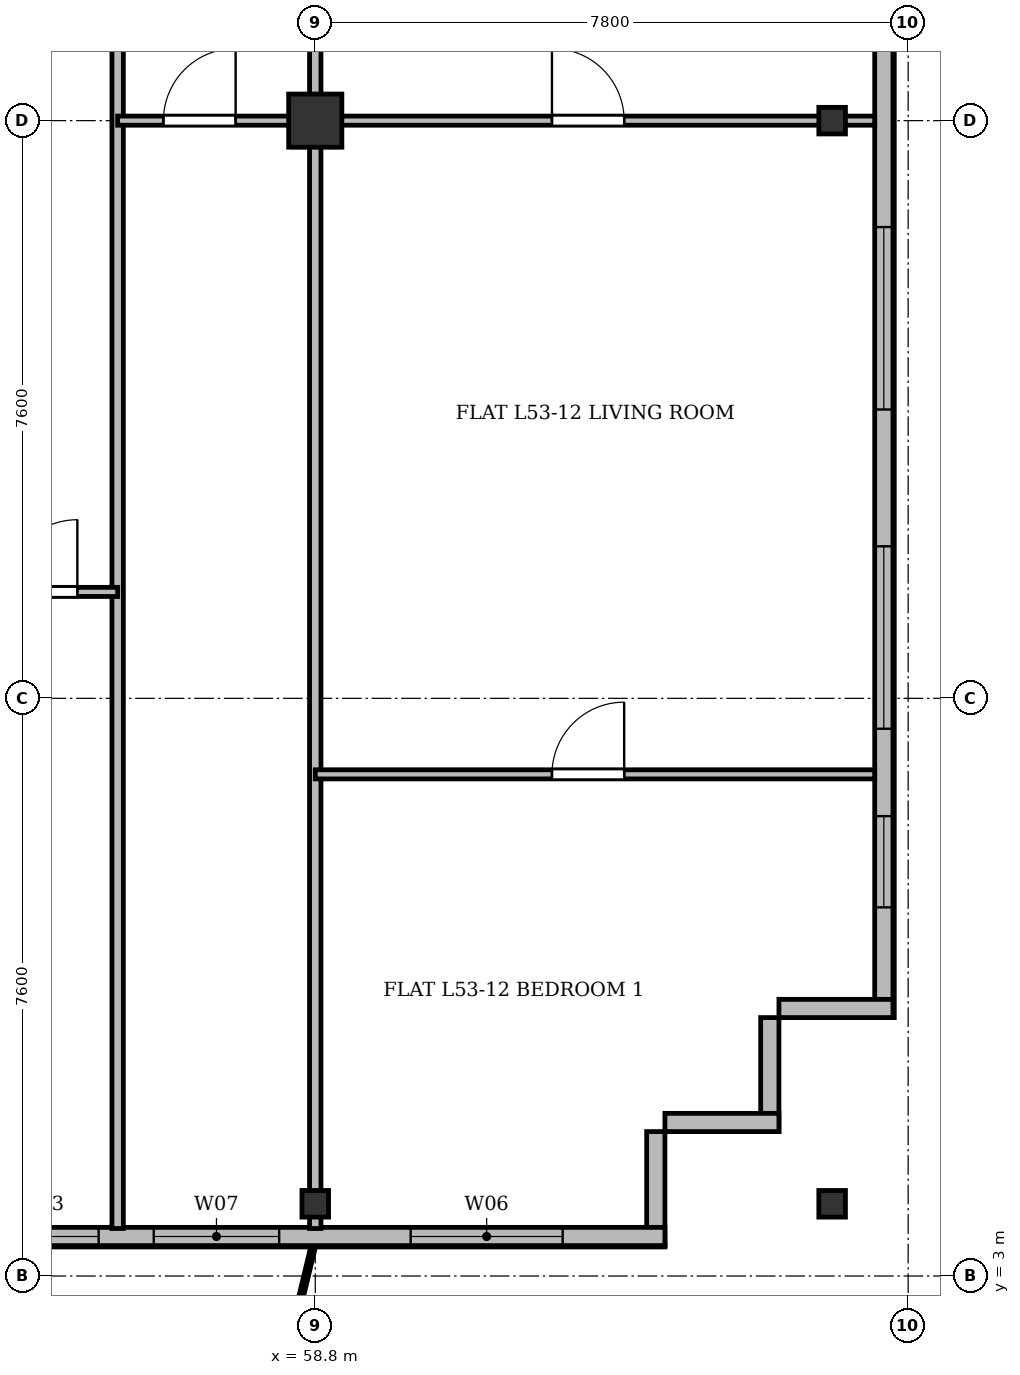
"""IFC4 building model, lengths in metres.
Left out: names, types, materials, properties, quantities, classifications, styles, units other than length and angle.
Written with IfcOpenShell. Run it as: python <this file> out.ifc"""

import sys

from ifc_helpers import new_model, si_unit, direction, frame, frame_2d, origin, origin_2d, place, context, subcontext, project, spatial, rectangle, i_section, extrude, source, transform, mapped, element, fill, save


model = new_model("IFC4")
c1 = context("Model", 3, precision=1e-05, world=origin(), true_north=direction((0.0, 1.0)))
c2 = subcontext(c1, "Body", "Model", "MODEL_VIEW")
j1 = project(units=[si_unit("LENGTHUNIT", "METRE"), si_unit("PLANEANGLEUNIT", "RADIAN")], contexts=[c1])
p1 = place(None, origin())
s1 = spatial("IfcSite", under=j1, at=p1, CompositionType="ELEMENT")
p2 = place(p1, origin())
s2 = spatial("IfcBuilding", under=s1, at=p2, CompositionType="ELEMENT")
p3 = place(p2, frame((0.0, 0.0, 204.9)))
s3 = spatial("IfcBuildingStorey", under=s2, at=p3, CompositionType="ELEMENT", Elevation=204.9)
m1 = source(origin(), c2, "Body", "SweptSolid", [
    extrude(i_section(OverallWidth=0.35, OverallDepth=0.35, WebThickness=0.018, FlangeThickness=0.028, at=origin_2d()), origin(), (0.0, 0.0, 1.0), 3.6),
])
p4 = place(p3, frame((58.8, 3.95, 0.0), z_axis=(0.0, 0.0, 1.0), x_axis=(1.0, 0.0, 0.0)))
e1 = element("IfcColumn", 1, at=p4, inside=s3, PredefinedType="COLUMN", context=c2, shape_type="MappedRepresentation", body=[
    mapped(m1, transform((0.0, 0.0, 0.0), x_axis=(1.0, 0.0, 0.0), y_axis=(0.0, 1.0, 0.0), z_axis=(0.0, 0.0, 1.0), scale=1.0)),
])
m2 = source(origin(), c2, "Body", "SweptSolid", [
    extrude(rectangle(XDim=0.7, YDim=0.7, at=origin_2d()), origin(), (0.0, 0.0, 1.0), 3.6),
])
p5 = place(p3, frame((58.8, 18.2, 0.0), z_axis=(0.0, 0.0, 1.0), x_axis=(1.0, 0.0, 0.0)))
e2 = element("IfcColumn", 2, at=p5, inside=s3, PredefinedType="COLUMN", context=c2, shape_type="MappedRepresentation", body=[
    mapped(m2, transform((0.0, 0.0, 0.0), x_axis=(1.0, 0.0, 0.0), y_axis=(0.0, 1.0, 0.0), z_axis=(0.0, 0.0, 1.0), scale=1.0)),
])
for number, where, z_axis, x_axis in (
    (3, (65.6, 3.95, 0.0), (0.0, 0.0, 1.0), (1.0, 0.0, 0.0)),
    (4, (65.6, 18.2, 0.0), (0.0, 0.0, 1.0), (1.0, 0.0, 0.0)),
):
    element("IfcColumn", number, at=place(p3, frame(where, z_axis=z_axis, x_axis=x_axis)), inside=s3, PredefinedType="COLUMN", context=c2, shape_type="MappedRepresentation", body=[
        mapped(m1, transform((0.0, 0.0, 0.0), x_axis=(1.0, 0.0, 0.0), y_axis=(0.0, 1.0, 0.0), z_axis=(0.0, 0.0, 1.0), scale=1.0)),
    ])
p6 = place(p3, frame((66.28, 45.5, 0.0), z_axis=(0.0, 0.0, 1.0), x_axis=(0.0, -1.0, 0.0)))
e5 = element("IfcWall", 5, at=p6, inside=s3, PredefinedType="SOLIDWALL", context=c2, shape_type="SweptSolid", body=[
    extrude(rectangle(XDim=39.1, YDim=0.24, at=frame_2d((19.55, 0.0))), origin(), (0.0, 0.0, 1.0), 3.36),
])
p7 = place(p6, frame((36.45, 0.0, 0.92)))
e6 = element("IfcOpeningElement", 6, at=p7, cuts=e5, PredefinedType="OPENING", context=c2, shape_type="SweptSolid", body=[
    extrude(rectangle(XDim=1.2, YDim=1.65, at=frame_2d((0.6, 0.825))), frame((0.0, 0.13, 0.0), z_axis=(0.0, -1.0, 0.0), x_axis=(1.0, 0.0, 0.0)), (0.0, 0.0, 1.0), 0.26),
])
p8 = place(p6, frame((32.9, 0.0, 0.92)))
e7 = element("IfcOpeningElement", 7, at=p8, cuts=e5, PredefinedType="OPENING", context=c2, shape_type="SweptSolid", body=[
    extrude(rectangle(XDim=2.4, YDim=2.1, at=frame_2d((1.2, 1.05))), frame((0.0, 0.13, 0.0), z_axis=(0.0, -1.0, 0.0), x_axis=(1.0, 0.0, 0.0)), (0.0, 0.0, 1.0), 0.26),
])
p9 = place(p6, frame((28.7, 0.0, 0.92)))
e8 = element("IfcOpeningElement", 8, at=p9, cuts=e5, PredefinedType="OPENING", context=c2, shape_type="SweptSolid", body=[
    extrude(rectangle(XDim=2.4, YDim=2.1, at=frame_2d((1.2, 1.05))), frame((0.0, 0.13, 0.0), z_axis=(0.0, -1.0, 0.0), x_axis=(1.0, 0.0, 0.0)), (0.0, 0.0, 1.0), 0.26),
])
p10 = place(p6, frame((21.5, 0.0, 0.92)))
e9 = element("IfcOpeningElement", 9, at=p10, cuts=e5, PredefinedType="OPENING", context=c2, shape_type="SweptSolid", body=[
    extrude(rectangle(XDim=2.4, YDim=2.1, at=frame_2d((1.2, 1.05))), frame((0.0, 0.13, 0.0), z_axis=(0.0, -1.0, 0.0), x_axis=(1.0, 0.0, 0.0)), (0.0, 0.0, 1.0), 0.26),
])
p11 = place(p6, frame((7.5, 0.0, 0.92)))
e10 = element("IfcOpeningElement", 10, at=p11, cuts=e5, PredefinedType="OPENING", context=c2, shape_type="SweptSolid", body=[
    extrude(rectangle(XDim=2.4, YDim=2.1, at=frame_2d((1.2, 1.05))), frame((0.0, 0.13, 0.0), z_axis=(0.0, -1.0, 0.0), x_axis=(1.0, 0.0, 0.0)), (0.0, 0.0, 1.0), 0.26),
])
p12 = place(p6, frame((4.5, 0.0, 0.92)))
e11 = element("IfcOpeningElement", 11, at=p12, cuts=e5, PredefinedType="OPENING", context=c2, shape_type="SweptSolid", body=[
    extrude(rectangle(XDim=1.2, YDim=1.65, at=frame_2d((0.6, 0.825))), frame((0.0, 0.13, 0.0), z_axis=(0.0, -1.0, 0.0), x_axis=(1.0, 0.0, 0.0)), (0.0, 0.0, 1.0), 0.26),
])
p13 = place(p6, frame((1.15, 0.0, 0.92)))
e12 = element("IfcOpeningElement", 12, at=p13, cuts=e5, PredefinedType="OPENING", context=c2, shape_type="SweptSolid", body=[
    extrude(rectangle(XDim=1.2, YDim=1.65, at=frame_2d((0.6, 0.825))), frame((0.0, 0.13, 0.0), z_axis=(0.0, -1.0, 0.0), x_axis=(1.0, 0.0, 0.0)), (0.0, 0.0, 1.0), 0.26),
])
p14 = place(p3, frame((66.4, 6.52, 0.0), z_axis=(0.0, 0.0, 1.0), x_axis=(-1.0, 0.0, 0.0)))
e13 = element("IfcWall", 13, at=p14, inside=s3, PredefinedType="SOLIDWALL", context=c2, shape_type="SweptSolid", body=[
    extrude(rectangle(XDim=1.5, YDim=0.24, at=frame_2d((0.75, 0.0))), origin(), (0.0, 0.0, 1.0), 2.86),
])
for number, where, z_axis, x_axis in (
    (14, (64.78, 6.4, 0.0), (0.0, 0.0, 1.0), (0.0, -1.0, 0.0)),
    (15, (64.9, 5.02, 0.0), (0.0, 0.0, 1.0), (-1.0, 0.0, 0.0)),
):
    element("IfcWall", number, at=place(p3, frame(where, z_axis=z_axis, x_axis=x_axis)), inside=s3, PredefinedType="SOLIDWALL", context=c2, shape_type="SweptSolid", body=[
        extrude(rectangle(XDim=1.5, YDim=0.24, at=frame_2d((0.75, 0.0))), origin(), (0.0, 0.0, 1.0), 3.36),
    ])
p15 = place(p3, frame((63.28, 4.9, 0.0), z_axis=(0.0, 0.0, 1.0), x_axis=(0.0, -1.0, 0.0)))
e16 = element("IfcWall", 16, at=p15, inside=s3, PredefinedType="SOLIDWALL", context=c2, shape_type="SweptSolid", body=[
    extrude(rectangle(XDim=1.5, YDim=0.24, at=frame_2d((0.75, 0.0))), origin(), (0.0, 0.0, 1.0), 2.91),
])
p16 = place(p3, frame((63.4, 3.52, 0.0), z_axis=(0.0, 0.0, 1.0), x_axis=(-1.0, 0.0, 0.0)))
e17 = element("IfcWall", 17, at=p16, inside=s3, PredefinedType="SOLIDWALL", context=c2, shape_type="SweptSolid", body=[
    extrude(rectangle(XDim=52.4, YDim=0.24, at=frame_2d((26.2, 0.0))), origin(), (0.0, 0.0, 1.0), 3.36),
])
p17 = place(p16, frame((1.345, 0.0, 0.9)))
e18 = element("IfcOpeningElement", 18, at=p17, cuts=e17, PredefinedType="OPENING", context=c2, shape_type="SweptSolid", body=[
    extrude(rectangle(XDim=2.0, YDim=1.95, at=frame_2d((1.0, 0.975))), frame((0.0, 0.13, 0.0), z_axis=(0.0, -1.0, 0.0), x_axis=(1.0, 0.0, 0.0)), (0.0, 0.0, 1.0), 0.26),
])
p18 = place(p16, frame((5.075, 0.0, 0.9)))
e19 = element("IfcOpeningElement", 19, at=p18, cuts=e17, PredefinedType="OPENING", context=c2, shape_type="SweptSolid", body=[
    extrude(rectangle(XDim=1.65, YDim=1.85, at=frame_2d((0.825, 0.925))), frame((0.0, 0.13, 0.0), z_axis=(0.0, -1.0, 0.0), x_axis=(1.0, 0.0, 0.0)), (0.0, 0.0, 1.0), 0.26),
])
p19 = place(p16, frame((7.45, 0.0, 0.9)))
e20 = element("IfcOpeningElement", 20, at=p19, cuts=e17, PredefinedType="OPENING", context=c2, shape_type="SweptSolid", body=[
    extrude(rectangle(XDim=1.5, YDim=1.75, at=frame_2d((0.75, 0.875))), frame((0.0, 0.13, 0.0), z_axis=(0.0, -1.0, 0.0), x_axis=(1.0, 0.0, 0.0)), (0.0, 0.0, 1.0), 0.26),
])
p20 = place(p16, frame((9.7, 0.0, 0.9)))
e21 = element("IfcOpeningElement", 21, at=p20, cuts=e17, PredefinedType="OPENING", context=c2, shape_type="SweptSolid", body=[
    extrude(rectangle(XDim=2.2, YDim=1.8, at=frame_2d((1.1, 0.9))), frame((0.0, 0.13, 0.0), z_axis=(0.0, -1.0, 0.0), x_axis=(1.0, 0.0, 0.0)), (0.0, 0.0, 1.0), 0.26),
])
p21 = place(p16, frame((14.217, 0.0, 0.0)))
e22 = element("IfcOpeningElement", 22, at=p21, cuts=e17, PredefinedType="OPENING", context=c2, shape_type="SweptSolid", body=[
    extrude(rectangle(XDim=1.2, YDim=2.2, at=frame_2d((0.6, 1.1))), frame((0.0, 0.13, 0.0), z_axis=(0.0, -1.0, 0.0), x_axis=(1.0, 0.0, 0.0)), (0.0, 0.0, 1.0), 0.26),
])
p22 = place(p16, frame((19.934, 0.0, 0.9)))
e23 = element("IfcOpeningElement", 23, at=p22, cuts=e17, PredefinedType="OPENING", context=c2, shape_type="SweptSolid", body=[
    extrude(rectangle(XDim=2.0, YDim=1.95, at=frame_2d((1.0, 0.975))), frame((0.0, 0.13, 0.0), z_axis=(0.0, -1.0, 0.0), x_axis=(1.0, 0.0, 0.0)), (0.0, 0.0, 1.0), 0.26),
])
p23 = place(p16, frame((22.775, 0.0, 0.9)))
e24 = element("IfcOpeningElement", 24, at=p23, cuts=e17, PredefinedType="OPENING", context=c2, shape_type="SweptSolid", body=[
    extrude(rectangle(XDim=1.65, YDim=1.85, at=frame_2d((0.825, 0.925))), frame((0.0, 0.13, 0.0), z_axis=(0.0, -1.0, 0.0), x_axis=(1.0, 0.0, 0.0)), (0.0, 0.0, 1.0), 0.26),
])
p24 = place(p16, frame((25.367, 0.0, 0.9)))
e25 = element("IfcOpeningElement", 25, at=p24, cuts=e17, PredefinedType="OPENING", context=c2, shape_type="SweptSolid", body=[
    extrude(rectangle(XDim=1.8, YDim=1.8, at=frame_2d((0.9, 0.9))), frame((0.0, 0.13, 0.0), z_axis=(0.0, -1.0, 0.0), x_axis=(1.0, 0.0, 0.0)), (0.0, 0.0, 1.0), 0.26),
])
p25 = place(p16, frame((29.1, 0.0, 0.9)))
e26 = element("IfcOpeningElement", 26, at=p25, cuts=e17, PredefinedType="OPENING", context=c2, shape_type="SweptSolid", body=[
    extrude(rectangle(XDim=2.2, YDim=1.8, at=frame_2d((1.1, 0.9))), frame((0.0, 0.13, 0.0), z_axis=(0.0, -1.0, 0.0), x_axis=(1.0, 0.0, 0.0)), (0.0, 0.0, 1.0), 0.26),
])
p26 = place(p16, frame((33.25, 0.0, 0.9)))
e27 = element("IfcOpeningElement", 27, at=p26, cuts=e17, PredefinedType="OPENING", context=c2, shape_type="SweptSolid", body=[
    extrude(rectangle(XDim=1.5, YDim=1.75, at=frame_2d((0.75, 0.875))), frame((0.0, 0.13, 0.0), z_axis=(0.0, -1.0, 0.0), x_axis=(1.0, 0.0, 0.0)), (0.0, 0.0, 1.0), 0.26),
])
p27 = place(p16, frame((35.65, 0.0, 0.9)))
e28 = element("IfcOpeningElement", 28, at=p27, cuts=e17, PredefinedType="OPENING", context=c2, shape_type="SweptSolid", body=[
    extrude(rectangle(XDim=1.5, YDim=1.75, at=frame_2d((0.75, 0.875))), frame((0.0, 0.13, 0.0), z_axis=(0.0, -1.0, 0.0), x_axis=(1.0, 0.0, 0.0)), (0.0, 0.0, 1.0), 0.26),
])
p28 = place(p16, frame((37.975, 0.0, 0.9)))
e29 = element("IfcOpeningElement", 29, at=p28, cuts=e17, PredefinedType="OPENING", context=c2, shape_type="SweptSolid", body=[
    extrude(rectangle(XDim=1.65, YDim=1.85, at=frame_2d((0.825, 0.925))), frame((0.0, 0.13, 0.0), z_axis=(0.0, -1.0, 0.0), x_axis=(1.0, 0.0, 0.0)), (0.0, 0.0, 1.0), 0.26),
])
p29 = place(p16, frame((41.456, 0.0, 0.0)))
e30 = element("IfcOpeningElement", 30, at=p29, cuts=e17, PredefinedType="OPENING", context=c2, shape_type="SweptSolid", body=[
    extrude(rectangle(XDim=1.2, YDim=2.2, at=frame_2d((0.6, 1.1))), frame((0.0, 0.13, 0.0), z_axis=(0.0, -1.0, 0.0), x_axis=(1.0, 0.0, 0.0)), (0.0, 0.0, 1.0), 0.26),
])
p30 = place(p16, frame((43.45, 0.0, 0.9)))
e31 = element("IfcOpeningElement", 31, at=p30, cuts=e17, PredefinedType="OPENING", context=c2, shape_type="SweptSolid", body=[
    extrude(rectangle(XDim=1.5, YDim=1.75, at=frame_2d((0.75, 0.875))), frame((0.0, 0.13, 0.0), z_axis=(0.0, -1.0, 0.0), x_axis=(1.0, 0.0, 0.0)), (0.0, 0.0, 1.0), 0.26),
])
p31 = place(p16, frame((45.75, 0.0, 0.9)))
e32 = element("IfcOpeningElement", 32, at=p31, cuts=e17, PredefinedType="OPENING", context=c2, shape_type="SweptSolid", body=[
    extrude(rectangle(XDim=1.5, YDim=1.75, at=frame_2d((0.75, 0.875))), frame((0.0, 0.13, 0.0), z_axis=(0.0, -1.0, 0.0), x_axis=(1.0, 0.0, 0.0)), (0.0, 0.0, 1.0), 0.26),
])
p32 = place(p16, frame((49.055, 0.0, 0.9)))
e33 = element("IfcOpeningElement", 33, at=p32, cuts=e17, PredefinedType="OPENING", context=c2, shape_type="SweptSolid", body=[
    extrude(rectangle(XDim=2.0, YDim=1.95, at=frame_2d((1.0, 0.975))), frame((0.0, 0.13, 0.0), z_axis=(0.0, -1.0, 0.0), x_axis=(1.0, 0.0, 0.0)), (0.0, 0.0, 1.0), 0.26),
])
p33 = place(p3, frame((58.8, 3.625, 0.0), z_axis=(0.0, 0.0, 1.0), x_axis=(0.0, 1.0, 0.0)))
e34 = element("IfcWall", 34, at=p33, inside=s3, PredefinedType="PARTITIONING", context=c2, shape_type="SweptSolid", body=[
    extrude(rectangle(XDim=27.175, YDim=0.15, at=frame_2d((13.587, 0.0))), origin(), (0.0, 0.0, 1.0), 2.86),
])
p34 = place(p3, frame((56.2, 3.625, 0.0), z_axis=(0.0, 0.0, 1.0), x_axis=(0.0, 1.0, 0.0)))
e35 = element("IfcWall", 35, at=p34, inside=s3, PredefinedType="PARTITIONING", context=c2, shape_type="SweptSolid", body=[
    extrude(rectangle(XDim=27.175, YDim=0.15, at=frame_2d((13.587, 0.0))), origin(), (0.0, 0.0, 1.0), 2.91),
])
p35 = place(p3, frame((54.2, 12.0, 0.0), z_axis=(0.0, 0.0, 1.0), x_axis=(1.0, 0.0, 0.0)))
e36 = element("IfcWall", 36, at=p35, inside=s3, PredefinedType="PARTITIONING", context=c2, shape_type="SweptSolid", body=[
    extrude(rectangle(XDim=2.0, YDim=0.12, at=frame_2d((1.0, 0.0))), origin(), (0.0, 0.0, 1.0), 3.36),
])
p36 = place(p35, frame((0.52, 0.0, 0.0)))
e37 = element("IfcOpeningElement", 37, at=p36, cuts=e36, PredefinedType="OPENING", context=c2, shape_type="SweptSolid", body=[
    extrude(rectangle(XDim=0.95, YDim=2.15, at=frame_2d((0.475, 1.075))), frame((0.0, 0.07, 0.0), z_axis=(0.0, -1.0, 0.0), x_axis=(1.0, 0.0, 0.0)), (0.0, 0.0, 1.0), 0.14),
])
p37 = place(p3, frame((56.2, 18.2, 0.0), z_axis=(0.0, 0.0, 1.0), x_axis=(1.0, 0.0, 0.0)))
e38 = element("IfcWall", 38, at=p37, inside=s3, PredefinedType="PARTITIONING", context=c2, shape_type="SweptSolid", body=[
    extrude(rectangle(XDim=2.6, YDim=0.12, at=frame_2d((1.3, 0.0))), origin(), (0.0, 0.0, 1.0), 2.91),
])
p38 = place(p37, frame((0.602, 0.0, 0.0)))
e39 = element("IfcOpeningElement", 39, at=p38, cuts=e38, PredefinedType="OPENING", context=c2, shape_type="SweptSolid", body=[
    extrude(rectangle(XDim=0.95, YDim=2.15, at=frame_2d((0.475, 1.075))), frame((0.0, 0.07, 0.0), z_axis=(0.0, -1.0, 0.0), x_axis=(1.0, 0.0, 0.0)), (0.0, 0.0, 1.0), 0.14),
])
p39 = place(p3, frame((58.8, 18.2, 0.0), z_axis=(0.0, 0.0, 1.0), x_axis=(1.0, 0.0, 0.0)))
e40 = element("IfcWall", 40, at=p39, inside=s3, PredefinedType="PARTITIONING", context=c2, shape_type="SweptSolid", body=[
    extrude(rectangle(XDim=7.36, YDim=0.12, at=frame_2d((3.68, 0.0))), origin(), (0.0, 0.0, 1.0), 2.91),
])
p40 = place(p39, frame((3.114, 0.0, 0.0)))
e41 = element("IfcOpeningElement", 41, at=p40, cuts=e40, PredefinedType="OPENING", context=c2, shape_type="SweptSolid", body=[
    extrude(rectangle(XDim=0.95, YDim=2.15, at=frame_2d((0.475, 1.075))), frame((0.0, 0.07, 0.0), z_axis=(0.0, -1.0, 0.0), x_axis=(1.0, 0.0, 0.0)), (0.0, 0.0, 1.0), 0.14),
])
p41 = place(p3, frame((58.8, 9.6, 0.0), z_axis=(0.0, 0.0, 1.0), x_axis=(1.0, 0.0, 0.0)))
e42 = element("IfcWall", 42, at=p41, inside=s3, PredefinedType="PARTITIONING", context=c2, shape_type="SweptSolid", body=[
    extrude(rectangle(XDim=7.36, YDim=0.12, at=frame_2d((3.68, 0.0))), origin(), (0.0, 0.0, 1.0), 2.86),
])
p42 = place(p41, frame((3.114, 0.0, 0.0)))
e43 = element("IfcOpeningElement", 43, at=p42, cuts=e42, PredefinedType="OPENING", context=c2, shape_type="SweptSolid", body=[
    extrude(rectangle(XDim=0.95, YDim=2.15, at=frame_2d((0.475, 1.075))), frame((0.0, 0.07, 0.0), z_axis=(0.0, -1.0, 0.0), x_axis=(1.0, 0.0, 0.0)), (0.0, 0.0, 1.0), 0.14),
])
m3 = source(origin(), c2, "Body", "SweptSolid", [
    extrude(rectangle(XDim=1.2, YDim=1.65, at=frame_2d((0.6, 0.825))), frame((0.0, 0.03, 0.0), z_axis=(0.0, -1.0, 0.0), x_axis=(1.0, 0.0, 0.0)), (0.0, 0.0, 1.0), 0.06),
])
p43 = place(p7, origin())
e44 = element("IfcWindow", 44, at=p43, inside=s3, PartitioningType="SINGLE_PANEL", PredefinedType="WINDOW", context=c2, shape_type="MappedRepresentation", body=[
    mapped(m3, transform((0.0, 0.0, 0.0), x_axis=(1.0, 0.0, 0.0), y_axis=(0.0, 1.0, 0.0), z_axis=(0.0, 0.0, 1.0), scale=1.0)),
])
fill(e6, e44)
m4 = source(origin(), c2, "Body", "SweptSolid", [
    extrude(rectangle(XDim=2.4, YDim=2.1, at=frame_2d((1.2, 1.05))), frame((0.0, 0.03, 0.0), z_axis=(0.0, -1.0, 0.0), x_axis=(1.0, 0.0, 0.0)), (0.0, 0.0, 1.0), 0.06),
])
p44 = place(p8, origin())
e45 = element("IfcWindow", 45, at=p44, inside=s3, PartitioningType="SINGLE_PANEL", PredefinedType="WINDOW", context=c2, shape_type="MappedRepresentation", body=[
    mapped(m4, transform((0.0, 0.0, 0.0), x_axis=(1.0, 0.0, 0.0), y_axis=(0.0, 1.0, 0.0), z_axis=(0.0, 0.0, 1.0), scale=1.0)),
])
fill(e7, e45)
p45 = place(p9, origin())
e46 = element("IfcWindow", 46, at=p45, inside=s3, PartitioningType="SINGLE_PANEL", PredefinedType="WINDOW", context=c2, shape_type="MappedRepresentation", body=[
    mapped(m4, transform((0.0, 0.0, 0.0), x_axis=(1.0, 0.0, 0.0), y_axis=(0.0, 1.0, 0.0), z_axis=(0.0, 0.0, 1.0), scale=1.0)),
])
fill(e8, e46)
m5 = source(origin(), c2, "Body", "SweptSolid", [
    extrude(rectangle(XDim=2.0, YDim=1.95, at=frame_2d((1.0, 0.975))), frame((0.0, 0.03, 0.0), z_axis=(0.0, -1.0, 0.0), x_axis=(1.0, 0.0, 0.0)), (0.0, 0.0, 1.0), 0.06),
])
p46 = place(p17, origin())
e47 = element("IfcWindow", 47, at=p46, inside=s3, PartitioningType="SINGLE_PANEL", PredefinedType="WINDOW", context=c2, shape_type="MappedRepresentation", body=[
    mapped(m5, transform((0.0, 0.0, 0.0), x_axis=(1.0, 0.0, 0.0), y_axis=(0.0, 1.0, 0.0), z_axis=(0.0, 0.0, 1.0), scale=1.0)),
])
fill(e18, e47)
m6 = source(origin(), c2, "Body", "SweptSolid", [
    extrude(rectangle(XDim=1.65, YDim=1.85, at=frame_2d((0.825, 0.925))), frame((0.0, 0.03, 0.0), z_axis=(0.0, -1.0, 0.0), x_axis=(1.0, 0.0, 0.0)), (0.0, 0.0, 1.0), 0.06),
])
p47 = place(p18, origin())
e48 = element("IfcWindow", 48, at=p47, inside=s3, PartitioningType="SINGLE_PANEL", PredefinedType="WINDOW", context=c2, shape_type="MappedRepresentation", body=[
    mapped(m6, transform((0.0, 0.0, 0.0), x_axis=(1.0, 0.0, 0.0), y_axis=(0.0, 1.0, 0.0), z_axis=(0.0, 0.0, 1.0), scale=1.0)),
])
fill(e19, e48)
m7 = source(origin(), c2, "Body", "SweptSolid", [
    extrude(rectangle(XDim=1.5, YDim=1.75, at=frame_2d((0.75, 0.875))), frame((0.0, 0.03, 0.0), z_axis=(0.0, -1.0, 0.0), x_axis=(1.0, 0.0, 0.0)), (0.0, 0.0, 1.0), 0.06),
])
p48 = place(p19, origin())
e49 = element("IfcWindow", 49, at=p48, inside=s3, PartitioningType="SINGLE_PANEL", PredefinedType="WINDOW", context=c2, shape_type="MappedRepresentation", body=[
    mapped(m7, transform((0.0, 0.0, 0.0), x_axis=(1.0, 0.0, 0.0), y_axis=(0.0, 1.0, 0.0), z_axis=(0.0, 0.0, 1.0), scale=1.0)),
])
fill(e20, e49)
m8 = source(origin(), c2, "Body", "SweptSolid", [
    extrude(rectangle(XDim=0.95, YDim=2.15, at=frame_2d((0.475, 1.075))), frame((0.0, 0.025, 0.0), z_axis=(0.0, -1.0, 0.0), x_axis=(1.0, 0.0, 0.0)), (0.0, 0.0, 1.0), 0.05),
])
p49 = place(p36, origin())
e50 = element("IfcDoor", 50, at=p49, inside=s3, OperationType="SINGLE_SWING_RIGHT", PredefinedType="DOOR", context=c2, shape_type="MappedRepresentation", body=[
    mapped(m8, transform((0.0, 0.0, 0.0), x_axis=(1.0, 0.0, 0.0), y_axis=(0.0, 1.0, 0.0), z_axis=(0.0, 0.0, 1.0), scale=1.0)),
])
fill(e37, e50)
p50 = place(p38, origin())
e51 = element("IfcDoor", 51, at=p50, inside=s3, OperationType="SINGLE_SWING_RIGHT", PredefinedType="DOOR", context=c2, shape_type="MappedRepresentation", body=[
    mapped(m8, transform((0.0, 0.0, 0.0), x_axis=(1.0, 0.0, 0.0), y_axis=(0.0, 1.0, 0.0), z_axis=(0.0, 0.0, 1.0), scale=1.0)),
])
fill(e39, e51)
p51 = place(p40, origin())
e52 = element("IfcDoor", 52, at=p51, inside=s3, OperationType="SINGLE_SWING_LEFT", PredefinedType="DOOR", context=c2, shape_type="MappedRepresentation", body=[
    mapped(m8, transform((0.0, 0.0, 0.0), x_axis=(1.0, 0.0, 0.0), y_axis=(0.0, 1.0, 0.0), z_axis=(0.0, 0.0, 1.0), scale=1.0)),
])
fill(e41, e52)
p52 = place(p42, origin())
e53 = element("IfcDoor", 53, at=p52, inside=s3, OperationType="SINGLE_SWING_RIGHT", PredefinedType="DOOR", context=c2, shape_type="MappedRepresentation", body=[
    mapped(m8, transform((0.0, 0.0, 0.0), x_axis=(1.0, 0.0, 0.0), y_axis=(0.0, 1.0, 0.0), z_axis=(0.0, 0.0, 1.0), scale=1.0)),
])
fill(e43, e53)
save(model, sys.argv[1])
